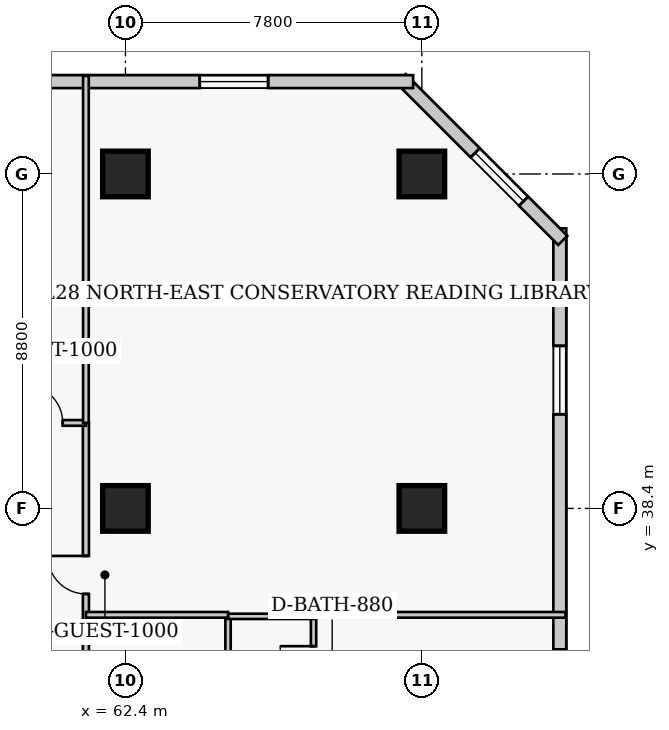
"""IFC4 building model, lengths in metres.
Left out: names, types, materials, properties, quantities, classifications, styles, units other than length and angle.
Written with IfcOpenShell. Run it as: python <this file> out.ifc"""

import sys

from ifc_helpers import new_model, si_unit, direction, frame, frame_2d, origin, origin_2d, place, context, subcontext, project, spatial, rectangle, extrude, element, fill, save


model = new_model("IFC4")
c1 = context("Model", 3, precision=1e-05, world=origin(), true_north=direction((0.0, 1.0)))
c2 = subcontext(c1, "Body", "Model", "MODEL_VIEW")
j1 = project(units=[si_unit("LENGTHUNIT", "METRE"), si_unit("PLANEANGLEUNIT", "RADIAN")], contexts=[c1])
p1 = place(None, origin())
s1 = spatial("IfcSite", under=j1, at=p1, CompositionType="ELEMENT")
p2 = place(p1, origin())
s2 = spatial("IfcBuilding", under=s1, at=p2, CompositionType="ELEMENT")
p3 = place(p2, frame((0.0, 0.0, 114.6)))
s3 = spatial("IfcBuildingStorey", under=s2, at=p3, CompositionType="ELEMENT", Elevation=114.6)
for number, where, z_axis, x_axis in (
    (1, (62.4, 38.4, 0.0), (0.0, 0.0, 1.0), (1.0, 0.0, 0.0)),
    (2, (62.4, 47.2, 0.0), (0.0, 0.0, 1.0), (1.0, 0.0, 0.0)),
    (3, (70.2, 38.4, 0.0), (0.0, 0.0, 1.0), (1.0, 0.0, 0.0)),
    (4, (70.2, 47.2, 0.0), (0.0, 0.0, 1.0), (1.0, 0.0, 0.0)),
):
    element("IfcColumn", number, at=place(p3, frame(where, z_axis=z_axis, x_axis=x_axis)), inside=s3, PredefinedType="COLUMN", context=c2, shape_type="SweptSolid", body=[
        extrude(rectangle(XDim=1.2, YDim=1.2, at=origin_2d()), origin(), (0.0, 0.0, 1.0), 3.8),
    ])
p4 = place(p3, frame((73.83, 13.83, 0.0), z_axis=(0.0, 0.0, 1.0), x_axis=(0.0, 1.0, 0.0)))
e5 = element("IfcWall", 5, at=p4, inside=s3, PredefinedType="SOLIDWALL", context=c2, shape_type="SweptSolid", body=[
    extrude(rectangle(XDim=31.94, YDim=0.34, at=frame_2d((15.97, 0.0))), origin(), (0.0, 0.0, 1.0), 3.54),
])
p5 = place(p4, frame((3.093, 0.0, 0.85)))
e6 = element("IfcOpeningElement", 6, at=p5, cuts=e5, PredefinedType="OPENING", context=c2, shape_type="SweptSolid", body=[
    extrude(rectangle(XDim=1.8, YDim=1.8, at=frame_2d((0.9, 0.9))), frame((0.0, 0.18, 0.0), z_axis=(0.0, -1.0, 0.0), x_axis=(1.0, 0.0, 0.0)), (0.0, 0.0, 1.0), 0.36),
])
p6 = place(p4, frame((11.077, 0.0, 0.85)))
e7 = element("IfcOpeningElement", 7, at=p6, cuts=e5, PredefinedType="OPENING", context=c2, shape_type="SweptSolid", body=[
    extrude(rectangle(XDim=1.8, YDim=1.8, at=frame_2d((0.9, 0.9))), frame((0.0, 0.18, 0.0), z_axis=(0.0, -1.0, 0.0), x_axis=(1.0, 0.0, 0.0)), (0.0, 0.0, 1.0), 0.36),
])
p7 = place(p4, frame((19.062, 0.0, 0.85)))
e8 = element("IfcOpeningElement", 8, at=p7, cuts=e5, PredefinedType="OPENING", context=c2, shape_type="SweptSolid", body=[
    extrude(rectangle(XDim=1.8, YDim=1.8, at=frame_2d((0.9, 0.9))), frame((0.0, 0.18, 0.0), z_axis=(0.0, -1.0, 0.0), x_axis=(1.0, 0.0, 0.0)), (0.0, 0.0, 1.0), 0.36),
])
p8 = place(p4, frame((27.048, 0.0, 0.85)))
e9 = element("IfcOpeningElement", 9, at=p8, cuts=e5, PredefinedType="OPENING", context=c2, shape_type="SweptSolid", body=[
    extrude(rectangle(XDim=1.8, YDim=1.8, at=frame_2d((0.9, 0.9))), frame((0.0, 0.18, 0.0), z_axis=(0.0, -1.0, 0.0), x_axis=(1.0, 0.0, 0.0)), (0.0, 0.0, 1.0), 0.36),
])
p9 = place(p3, frame((73.908, 45.451, 0.0), z_axis=(0.0, 0.0, 1.0), x_axis=(-0.707106781187, 0.707106781187, 0.0)))
e10 = element("IfcWall", 10, at=p9, inside=s3, PredefinedType="SOLIDWALL", context=c2, shape_type="SweptSolid", body=[
    extrude(rectangle(XDim=6.02, YDim=0.34, at=frame_2d((3.01, 0.0))), origin(), (0.0, 0.0, 1.0), 3.54),
])
p10 = place(p9, frame((1.46, 0.0, 0.85)))
e11 = element("IfcOpeningElement", 11, at=p10, cuts=e10, PredefinedType="OPENING", context=c2, shape_type="SweptSolid", body=[
    extrude(rectangle(XDim=1.8, YDim=1.8, at=frame_2d((0.9, 0.9))), frame((0.0, 0.18, 0.0), z_axis=(0.0, -1.0, 0.0), x_axis=(1.0, 0.0, 0.0)), (0.0, 0.0, 1.0), 0.36),
])
p11 = place(p3, frame((69.97, 49.63, 0.0), z_axis=(0.0, 0.0, 1.0), x_axis=(-1.0, 0.0, 0.0)))
e12 = element("IfcWall", 12, at=p11, inside=s3, PredefinedType="SOLIDWALL", context=c2, shape_type="SweptSolid", body=[
    extrude(rectangle(XDim=28.29, YDim=0.34, at=frame_2d((14.145, 0.0))), origin(), (0.0, 0.0, 1.0), 3.54),
])
p12 = place(p11, frame((3.815, 0.0, 0.85)))
e13 = element("IfcOpeningElement", 13, at=p12, cuts=e12, PredefinedType="OPENING", context=c2, shape_type="SweptSolid", body=[
    extrude(rectangle(XDim=1.8, YDim=1.8, at=frame_2d((0.9, 0.9))), frame((0.0, 0.18, 0.0), z_axis=(0.0, -1.0, 0.0), x_axis=(1.0, 0.0, 0.0)), (0.0, 0.0, 1.0), 0.36),
])
p13 = place(p11, frame((13.245, 0.0, 0.85)))
e14 = element("IfcOpeningElement", 14, at=p13, cuts=e12, PredefinedType="OPENING", context=c2, shape_type="SweptSolid", body=[
    extrude(rectangle(XDim=1.8, YDim=1.8, at=frame_2d((0.9, 0.9))), frame((0.0, 0.18, 0.0), z_axis=(0.0, -1.0, 0.0), x_axis=(1.0, 0.0, 0.0)), (0.0, 0.0, 1.0), 0.36),
])
p14 = place(p11, frame((22.675, 0.0, 0.85)))
e15 = element("IfcOpeningElement", 15, at=p14, cuts=e12, PredefinedType="OPENING", context=c2, shape_type="SweptSolid", body=[
    extrude(rectangle(XDim=1.8, YDim=1.8, at=frame_2d((0.9, 0.9))), frame((0.0, 0.18, 0.0), z_axis=(0.0, -1.0, 0.0), x_axis=(1.0, 0.0, 0.0)), (0.0, 0.0, 1.0), 0.36),
])
p15 = place(p3, frame((61.36, 11.85, 0.0), z_axis=(0.0, 0.0, 1.0), x_axis=(0.0, 1.0, 0.0)))
e16 = element("IfcWall", 16, at=p15, inside=s3, PredefinedType="PARTITIONING", context=c2, shape_type="SweptSolid", body=[
    extrude(rectangle(XDim=28.8, YDim=0.16, at=frame_2d((14.4, 0.0))), origin(), (0.0, 0.0, 1.0), 3.54),
])
p16 = place(p15, frame((3.6, 0.0, 0.0)))
e17 = element("IfcOpeningElement", 17, at=p16, cuts=e16, PredefinedType="OPENING", context=c2, shape_type="SweptSolid", body=[
    extrude(rectangle(XDim=0.95, YDim=2.1, at=frame_2d((0.475, 1.05))), frame((0.0, 0.09, 0.0), z_axis=(0.0, -1.0, 0.0), x_axis=(1.0, 0.0, 0.0)), (0.0, 0.0, 1.0), 0.18),
])
p17 = place(p15, frame((12.075, 0.0, 0.0)))
e18 = element("IfcOpeningElement", 18, at=p17, cuts=e16, PredefinedType="OPENING", context=c2, shape_type="SweptSolid", body=[
    extrude(rectangle(XDim=0.95, YDim=2.1, at=frame_2d((0.475, 1.05))), frame((0.0, 0.09, 0.0), z_axis=(0.0, -1.0, 0.0), x_axis=(1.0, 0.0, 0.0)), (0.0, 0.0, 1.0), 0.18),
])
p18 = place(p15, frame((19.875, 0.0, 0.0)))
e19 = element("IfcOpeningElement", 19, at=p18, cuts=e16, PredefinedType="OPENING", context=c2, shape_type="SweptSolid", body=[
    extrude(rectangle(XDim=0.95, YDim=2.1, at=frame_2d((0.475, 1.05))), frame((0.0, 0.09, 0.0), z_axis=(0.0, -1.0, 0.0), x_axis=(1.0, 0.0, 0.0)), (0.0, 0.0, 1.0), 0.18),
])
p19 = place(p15, frame((24.3, 0.0, 0.0)))
e20 = element("IfcOpeningElement", 20, at=p19, cuts=e16, PredefinedType="OPENING", context=c2, shape_type="SweptSolid", body=[
    extrude(rectangle(XDim=1.0, YDim=2.15, at=frame_2d((0.5, 1.075))), frame((0.0, 0.09, 0.0), z_axis=(0.0, -1.0, 0.0), x_axis=(1.0, 0.0, 0.0)), (0.0, 0.0, 1.0), 0.18),
])
p20 = place(p3, frame((56.8, 40.65, 0.0), z_axis=(0.0, 0.0, 1.0), x_axis=(1.0, 0.0, 0.0)))
e21 = element("IfcWall", 21, at=p20, inside=s3, PredefinedType="PARTITIONING", context=c2, shape_type="SweptSolid", body=[
    extrude(rectangle(XDim=4.56, YDim=0.15, at=frame_2d((2.28, 0.0))), origin(), (0.0, 0.0, 1.0), 3.54),
])
p21 = place(p20, frame((2.95, 0.0, 0.0)))
e22 = element("IfcOpeningElement", 22, at=p21, cuts=e21, PredefinedType="OPENING", context=c2, shape_type="SweptSolid", body=[
    extrude(rectangle(XDim=1.0, YDim=2.15, at=frame_2d((0.5, 1.075))), frame((0.0, 0.085, 0.0), z_axis=(0.0, -1.0, 0.0), x_axis=(1.0, 0.0, 0.0)), (0.0, 0.0, 1.0), 0.17),
])
p22 = place(p3, frame((61.36, 40.65, 0.0), z_axis=(0.0, 0.0, 1.0), x_axis=(0.0, 1.0, 0.0)))
e23 = element("IfcWall", 23, at=p22, inside=s3, PredefinedType="PARTITIONING", context=c2, shape_type="SweptSolid", body=[
    extrude(rectangle(XDim=9.13, YDim=0.15, at=frame_2d((4.565, 0.0))), origin(), (0.0, 0.0, 1.0), 3.54),
])
p23 = place(p3, frame((65.1, 33.11, 0.0), z_axis=(0.0, 0.0, 1.0), x_axis=(0.0, 1.0, 0.0)))
e24 = element("IfcWall", 24, at=p23, inside=s3, PredefinedType="PLUMBINGWALL", context=c2, shape_type="SweptSolid", body=[
    extrude(rectangle(XDim=2.45, YDim=0.14, at=frame_2d((1.225, 0.0))), origin(), (0.0, 0.0, 1.0), 3.54),
])
p24 = place(p3, frame((67.35, 33.11, 0.0), z_axis=(0.0, 0.0, 1.0), x_axis=(0.0, 1.0, 0.0)))
e25 = element("IfcWall", 25, at=p24, inside=s3, PredefinedType="PLUMBINGWALL", context=c2, shape_type="SweptSolid", body=[
    extrude(rectangle(XDim=2.45, YDim=0.14, at=frame_2d((1.225, 0.0))), origin(), (0.0, 0.0, 1.0), 3.54),
])
p25 = place(p24, frame((0.785, 0.0, 0.0)))
e26 = element("IfcOpeningElement", 26, at=p25, cuts=e25, PredefinedType="OPENING", context=c2, shape_type="SweptSolid", body=[
    extrude(rectangle(XDim=0.88, YDim=2.05, at=frame_2d((0.44, 1.025))), frame((0.0, 0.08, 0.0), z_axis=(0.0, -1.0, 0.0), x_axis=(1.0, 0.0, 0.0)), (0.0, 0.0, 1.0), 0.16),
])
p26 = place(p3, frame((65.1, 35.56, 0.0), z_axis=(0.0, 0.0, 1.0), x_axis=(1.0, 0.0, 0.0)))
e27 = element("IfcWall", 27, at=p26, inside=s3, PredefinedType="PLUMBINGWALL", context=c2, shape_type="SweptSolid", body=[
    extrude(rectangle(XDim=2.25, YDim=0.14, at=frame_2d((1.125, 0.0))), origin(), (0.0, 0.0, 1.0), 3.54),
])
p27 = place(p3, frame((61.36, 35.6, 0.0), z_axis=(0.0, 0.0, 1.0), x_axis=(1.0, 0.0, 0.0)))
e28 = element("IfcWall", 28, at=p27, inside=s3, PredefinedType="PARTITIONING", context=c2, shape_type="SweptSolid", body=[
    extrude(rectangle(XDim=3.74, YDim=0.15, at=frame_2d((1.87, 0.0))), origin(), (0.0, 0.0, 1.0), 3.54),
])
p28 = place(p3, frame((67.35, 35.6, 0.0), z_axis=(0.0, 0.0, 1.0), x_axis=(1.0, 0.0, 0.0)))
e29 = element("IfcWall", 29, at=p28, inside=s3, PredefinedType="PARTITIONING", context=c2, shape_type="SweptSolid", body=[
    extrude(rectangle(XDim=6.63, YDim=0.15, at=frame_2d((3.315, 0.0))), origin(), (0.0, 0.0, 1.0), 3.54),
])
p29 = place(p7, origin())
e30 = element("IfcWindow", 30, at=p29, inside=s3, PartitioningType="SINGLE_PANEL", PredefinedType="WINDOW", context=c2, shape_type="SweptSolid", body=[
    extrude(rectangle(XDim=1.8, YDim=1.8, at=frame_2d((0.9, 0.9))), frame((0.0, 0.03, 0.0), z_axis=(0.0, -1.0, 0.0), x_axis=(1.0, 0.0, 0.0)), (0.0, 0.0, 1.0), 0.06),
])
fill(e8, e30)
p30 = place(p8, origin())
e31 = element("IfcWindow", 31, at=p30, inside=s3, PartitioningType="SINGLE_PANEL", PredefinedType="WINDOW", context=c2, shape_type="SweptSolid", body=[
    extrude(rectangle(XDim=1.8, YDim=1.8, at=frame_2d((0.9, 0.9))), frame((0.0, 0.03, 0.0), z_axis=(0.0, -1.0, 0.0), x_axis=(1.0, 0.0, 0.0)), (0.0, 0.0, 1.0), 0.06),
])
fill(e9, e31)
p31 = place(p10, origin())
e32 = element("IfcWindow", 32, at=p31, inside=s3, PartitioningType="SINGLE_PANEL", PredefinedType="WINDOW", context=c2, shape_type="SweptSolid", body=[
    extrude(rectangle(XDim=1.8, YDim=1.8, at=frame_2d((0.9, 0.9))), frame((0.0, 0.03, 0.0), z_axis=(0.0, -1.0, 0.0), x_axis=(1.0, 0.0, 0.0)), (0.0, 0.0, 1.0), 0.06),
])
fill(e11, e32)
p32 = place(p12, origin())
e33 = element("IfcWindow", 33, at=p32, inside=s3, PartitioningType="SINGLE_PANEL", PredefinedType="WINDOW", context=c2, shape_type="SweptSolid", body=[
    extrude(rectangle(XDim=1.8, YDim=1.8, at=frame_2d((0.9, 0.9))), frame((0.0, 0.03, 0.0), z_axis=(0.0, -1.0, 0.0), x_axis=(1.0, 0.0, 0.0)), (0.0, 0.0, 1.0), 0.06),
])
fill(e13, e33)
p33 = place(p21, origin())
e34 = element("IfcDoor", 34, at=p33, inside=s3, OperationType="SINGLE_SWING_LEFT", PredefinedType="DOOR", context=c2, shape_type="SweptSolid", body=[
    extrude(rectangle(XDim=1.0, YDim=2.15, at=frame_2d((0.5, 1.075))), frame((0.0, 0.025, 0.0), z_axis=(0.0, -1.0, 0.0), x_axis=(1.0, 0.0, 0.0)), (0.0, 0.0, 1.0), 0.05),
])
fill(e22, e34)
p34 = place(p25, origin())
e35 = element("IfcDoor", 35, at=p34, inside=s3, OperationType="SINGLE_SWING_RIGHT", PredefinedType="DOOR", context=c2, shape_type="SweptSolid", body=[
    extrude(rectangle(XDim=0.88, YDim=2.05, at=frame_2d((0.44, 1.025))), frame((0.0, 0.025, 0.0), z_axis=(0.0, -1.0, 0.0), x_axis=(1.0, 0.0, 0.0)), (0.0, 0.0, 1.0), 0.05),
])
fill(e26, e35)
p35 = place(p19, origin())
e36 = element("IfcDoor", 36, at=p35, inside=s3, OperationType="SINGLE_SWING_RIGHT", PredefinedType="DOOR", context=c2, shape_type="SweptSolid", body=[
    extrude(rectangle(XDim=1.0, YDim=2.15, at=frame_2d((0.5, 1.075))), frame((0.0, 0.025, 0.0), z_axis=(0.0, -1.0, 0.0), x_axis=(1.0, 0.0, 0.0)), (0.0, 0.0, 1.0), 0.05),
])
fill(e20, e36)
save(model, sys.argv[1])
